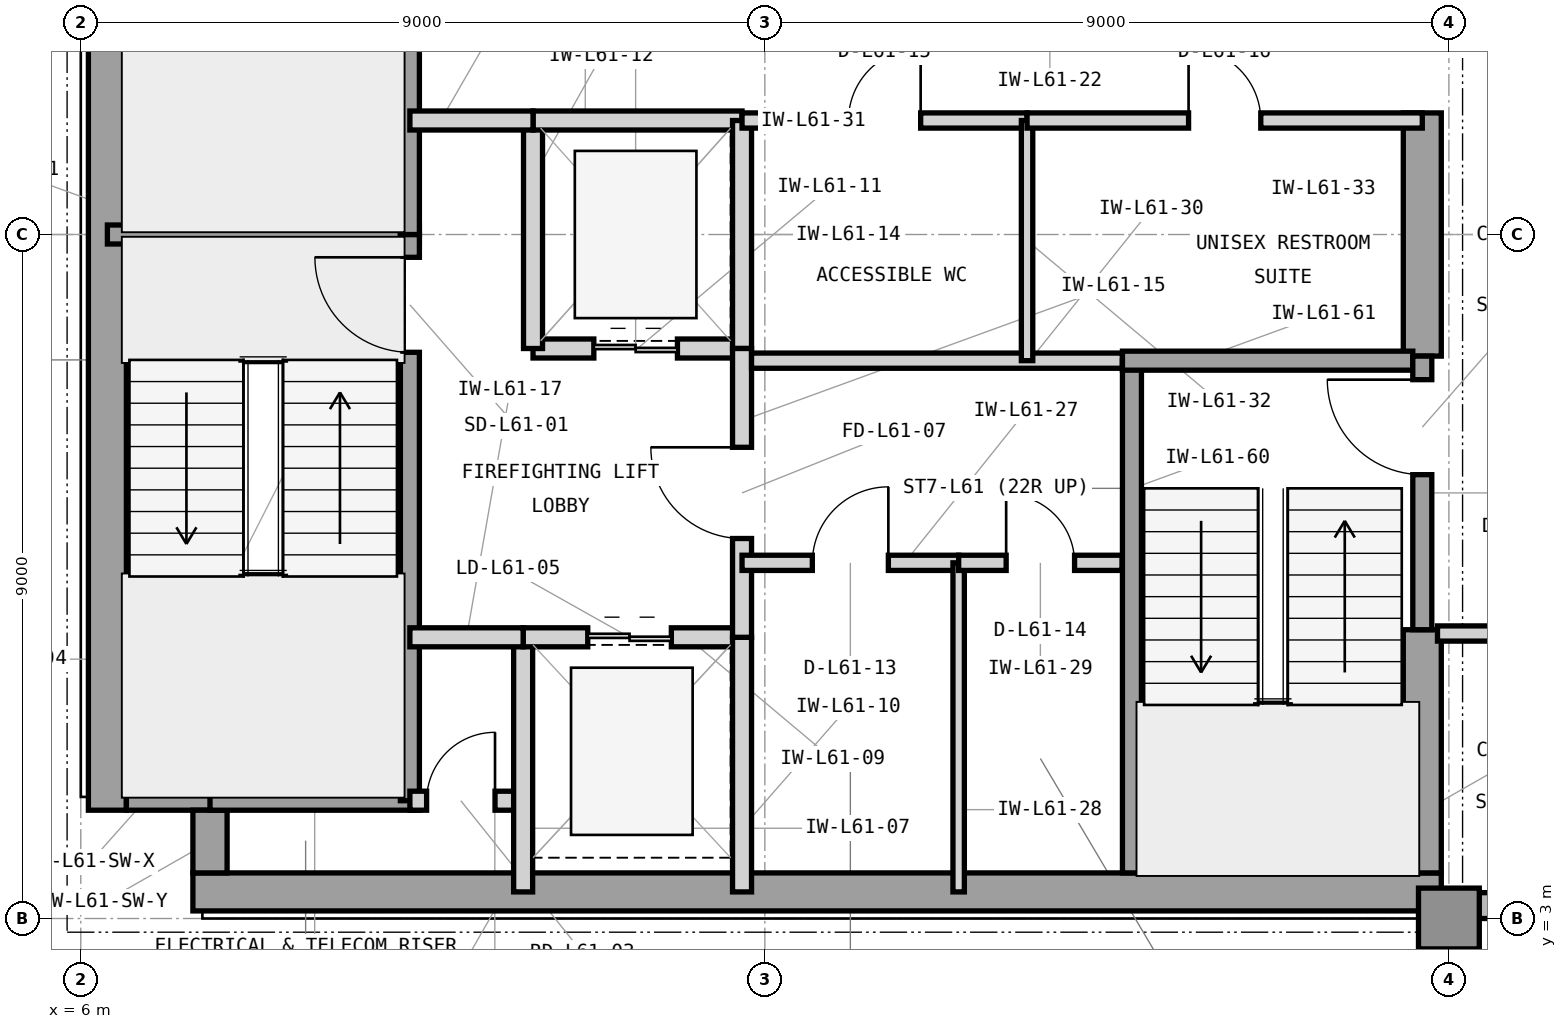
"""IFC4 building model, lengths in metres.
Left out: names, types, materials, properties, quantities, classifications, styles, units other than length and angle.
Written with IfcOpenShell. Run it as: python <this file> out.ifc"""

import sys

from ifc_helpers import new_model, si_unit, direction, frame, frame_2d, origin, origin_2d, place, context, subcontext, project, spatial, rectangle, extrude, element, fill, save


model = new_model("IFC4")
c1 = context("Model", 3, precision=1e-05, world=origin(), true_north=direction((0.0, 1.0)))
c2 = subcontext(c1, "Body", "Model", "MODEL_VIEW")
j1 = project(units=[si_unit("LENGTHUNIT", "METRE"), si_unit("PLANEANGLEUNIT", "RADIAN")], contexts=[c1])
p1 = place(None, origin())
s1 = spatial("IfcSite", under=j1, at=p1, CompositionType="ELEMENT")
p2 = place(p1, origin())
s2 = spatial("IfcBuilding", under=s1, at=p2, CompositionType="ELEMENT")
p3 = place(p2, frame((0.0, 0.0, 250.8)))
s3 = spatial("IfcBuildingStorey", under=s2, at=p3, CompositionType="ELEMENT", Elevation=250.8)
p4 = place(p3, frame((7.475, 3.35, 0.0), z_axis=(0.0, 0.0, 1.0), x_axis=(1.0, 0.0, 0.0)))
e1 = element("IfcWall", 1, at=p4, inside=s3, PredefinedType="SHEAR", context=c2, shape_type="SweptSolid", body=[
    extrude(rectangle(XDim=16.425, YDim=0.5, at=frame_2d((8.212, 0.0))), origin(), (0.0, 0.0, 1.0), 3.9),
])
p5 = place(p3, frame((6.35, 4.425, 0.0), z_axis=(0.0, 0.0, 1.0), x_axis=(0.0, 1.0, 0.0)))
e2 = element("IfcWall", 2, at=p5, inside=s3, PredefinedType="SHEAR", context=c2, shape_type="SweptSolid", body=[
    extrude(rectangle(XDim=15.15, YDim=0.5, at=frame_2d((7.575, 0.0))), origin(), (0.0, 0.0, 1.0), 3.9),
])
p6 = place(p3, frame((23.65, 3.6, 0.0), z_axis=(0.0, 0.0, 1.0), x_axis=(0.0, 1.0, 0.0)))
e3 = element("IfcWall", 3, at=p6, inside=s3, PredefinedType="SHEAR", context=c2, shape_type="SweptSolid", body=[
    extrude(rectangle(XDim=3.2, YDim=0.5, at=frame_2d((1.6, 0.0))), origin(), (0.0, 0.0, 1.0), 3.9),
])
p7 = place(p3, frame((23.65, 10.4, 0.0), z_axis=(0.0, 0.0, 1.0), x_axis=(0.0, 1.0, 0.0)))
e4 = element("IfcWall", 4, at=p7, inside=s3, PredefinedType="SHEAR", context=c2, shape_type="SweptSolid", body=[
    extrude(rectangle(XDim=3.2, YDim=0.5, at=frame_2d((1.6, 0.0))), origin(), (0.0, 0.0, 1.0), 3.9),
])
p8 = place(p3, frame((6.6, 4.65, 0.0), z_axis=(0.0, 0.0, 1.0), x_axis=(1.0, 0.0, 0.0)))
e5 = element("IfcWall", 5, at=p8, inside=s3, PredefinedType="SHEAR", context=c2, shape_type="SweptSolid", body=[
    extrude(rectangle(XDim=1.325, YDim=0.45, at=frame_2d((0.663, 0.0))), origin(), (0.0, 0.0, 1.0), 3.9),
])
p9 = place(p3, frame((7.7, 3.6, 0.0), z_axis=(0.0, 0.0, 1.0), x_axis=(0.0, 1.0, 0.0)))
e6 = element("IfcWall", 6, at=p9, inside=s3, PredefinedType="SHEAR", context=c2, shape_type="SweptSolid", body=[
    extrude(rectangle(XDim=0.825, YDim=0.45, at=frame_2d((0.413, 0.0))), origin(), (0.0, 0.0, 1.0), 3.9),
])
p10 = place(p3, frame((24.0, 3.0, 0.0), z_axis=(0.0, 0.0, 1.0), x_axis=(1.0, 0.0, 0.0)))
e7 = element("IfcColumn", 7, at=p10, inside=s3, PredefinedType="COLUMN", context=c2, shape_type="SweptSolid", body=[
    extrude(rectangle(XDim=0.8, YDim=0.8, at=origin_2d()), origin(), (0.0, 0.0, 1.0), 3.9),
])
p11 = place(p3, frame((23.9, 3.17, 0.0), z_axis=(0.0, 0.0, 1.0), x_axis=(1.0, 0.0, 0.0)))
e8 = element("IfcWall", 8, at=p11, inside=s3, PredefinedType="STANDARD", context=c2, shape_type="SweptSolid", body=[
    extrude(rectangle(XDim=28.5, YDim=0.34, at=frame_2d((14.25, 0.0))), origin(), (0.0, 0.0, 1.0), 3.715),
])
p12 = place(p11, frame((10.725, 0.0, 0.9)))
e9 = element("IfcOpeningElement", 9, at=p12, cuts=e8, PredefinedType="OPENING", context=c2, shape_type="SweptSolid", body=[
    extrude(rectangle(XDim=2.3, YDim=2.2, at=frame_2d((1.15, 1.1))), frame((0.0, 0.18, 0.0), z_axis=(0.0, -1.0, 0.0), x_axis=(1.0, 0.0, 0.0)), (0.0, 0.0, 1.0), 0.36),
])
p13 = place(p11, frame((0.85, 0.0, 0.9)))
e10 = element("IfcOpeningElement", 10, at=p13, cuts=e8, PredefinedType="OPENING", context=c2, shape_type="SweptSolid", body=[
    extrude(rectangle(XDim=1.6, YDim=2.2, at=frame_2d((0.8, 1.1))), frame((0.0, 0.18, 0.0), z_axis=(0.0, -1.0, 0.0), x_axis=(1.0, 0.0, 0.0)), (0.0, 0.0, 1.0), 0.36),
])
p14 = place(p11, frame((19.075, 0.0, 0.9)))
e11 = element("IfcOpeningElement", 11, at=p14, cuts=e8, PredefinedType="OPENING", context=c2, shape_type="SweptSolid", body=[
    extrude(rectangle(XDim=2.3, YDim=2.2, at=frame_2d((1.15, 1.1))), frame((0.0, 0.18, 0.0), z_axis=(0.0, -1.0, 0.0), x_axis=(1.0, 0.0, 0.0)), (0.0, 0.0, 1.0), 0.36),
])
p15 = place(p3, frame((6.35, 12.0, 0.0), z_axis=(0.0, 0.0, 1.0), x_axis=(1.0, 0.0, 0.0)))
e12 = element("IfcWall", 12, at=p15, inside=s3, PredefinedType="SHEAR", context=c2, shape_type="SweptSolid", body=[
    extrude(rectangle(XDim=4.105, YDim=0.25, at=frame_2d((2.052, 0.0))), origin(), (0.0, 0.0, 1.0), 3.9),
])
p16 = place(p3, frame((7.7, 4.55, 0.0), z_axis=(0.0, 0.0, 1.0), x_axis=(1.0, 0.0, 0.0)))
e13 = element("IfcWall", 13, at=p16, inside=s3, PredefinedType="SHEAR", context=c2, shape_type="SweptSolid", body=[
    extrude(rectangle(XDim=2.755, YDim=0.25, at=frame_2d((1.377, 0.0))), origin(), (0.0, 0.0, 1.0), 3.9),
])
p17 = place(p3, frame((10.33, 4.55, 0.0), z_axis=(0.0, 0.0, 1.0), x_axis=(0.0, 1.0, 0.0)))
e14 = element("IfcWall", 14, at=p17, inside=s3, PredefinedType="SHEAR", context=c2, shape_type="SweptSolid", body=[
    extrude(rectangle(XDim=7.45, YDim=0.25, at=frame_2d((3.725, 0.0))), origin(), (0.0, 0.0, 1.0), 3.9),
])
p18 = place(p17, frame((5.9, 0.0, 0.0)))
e15 = element("IfcOpeningElement", 15, at=p18, cuts=e14, PredefinedType="OPENING", context=c2, shape_type="SweptSolid", body=[
    extrude(rectangle(XDim=1.25, YDim=2.2, at=frame_2d((0.625, 1.1))), frame((0.0, 0.135, 0.0), z_axis=(0.0, -1.0, 0.0), x_axis=(1.0, 0.0, 0.0)), (0.0, 0.0, 1.0), 0.27),
])
p19 = place(p3, frame((10.33, 12.0, 0.0), z_axis=(0.0, 0.0, 1.0), x_axis=(0.0, 1.0, 0.0)))
e16 = element("IfcWall", 16, at=p19, inside=s3, PredefinedType="SHEAR", context=c2, shape_type="SweptSolid", body=[
    extrude(rectangle(XDim=7.45, YDim=0.25, at=frame_2d((3.725, 0.0))), origin(), (0.0, 0.0, 1.0), 3.9),
])
p20 = place(p19, frame((5.85, 0.0, 0.0)))
e17 = element("IfcOpeningElement", 17, at=p20, cuts=e16, PredefinedType="OPENING", context=c2, shape_type="SweptSolid", body=[
    extrude(rectangle(XDim=1.25, YDim=2.2, at=frame_2d((0.625, 1.1))), frame((0.0, 0.135, 0.0), z_axis=(0.0, -1.0, 0.0), x_axis=(1.0, 0.0, 0.0)), (0.0, 0.0, 1.0), 0.27),
])
p21 = place(p3, frame((10.33, 4.55, 0.0), z_axis=(0.0, 0.0, 1.0), x_axis=(1.0, 0.0, 0.0)))
e18 = element("IfcWall", 18, at=p21, inside=s3, PredefinedType="PARTITIONING", context=c2, shape_type="SweptSolid", body=[
    extrude(rectangle(XDim=1.49, YDim=0.25, at=frame_2d((0.745, 0.0))), origin(), (0.0, 0.0, 1.0), 3.63),
])
p22 = place(p21, frame((0.22, 0.0, 0.0)))
e19 = element("IfcOpeningElement", 19, at=p22, cuts=e18, PredefinedType="OPENING", context=c2, shape_type="SweptSolid", body=[
    extrude(rectangle(XDim=0.9, YDim=2.1, at=frame_2d((0.45, 1.05))), frame((0.0, 0.135, 0.0), z_axis=(0.0, -1.0, 0.0), x_axis=(1.0, 0.0, 0.0)), (0.0, 0.0, 1.0), 0.27),
])
p23 = place(p3, frame((11.82, 3.35, 0.0), z_axis=(0.0, 0.0, 1.0), x_axis=(0.0, 1.0, 0.0)))
e20 = element("IfcWall", 20, at=p23, inside=s3, PredefinedType="PARTITIONING", context=c2, shape_type="SweptSolid", body=[
    extrude(rectangle(XDim=3.35, YDim=0.25, at=frame_2d((1.675, 0.0))), origin(), (0.0, 0.0, 1.0), 3.63),
])
p24 = place(p3, frame((11.82, 6.7, 0.0), z_axis=(0.0, 0.0, 1.0), x_axis=(1.0, 0.0, 0.0)))
e21 = element("IfcWall", 21, at=p24, inside=s3, PredefinedType="PARTITIONING", context=c2, shape_type="SweptSolid", body=[
    extrude(rectangle(XDim=2.88, YDim=0.25, at=frame_2d((1.44, 0.0))), origin(), (0.0, 0.0, 1.0), 3.088),
])
p25 = place(p24, frame((0.85, 0.0, 0.0)))
e22 = element("IfcOpeningElement", 22, at=p25, cuts=e21, PredefinedType="OPENING", context=c2, shape_type="SweptSolid", body=[
    extrude(rectangle(XDim=1.1, YDim=2.25, at=frame_2d((0.55, 1.125))), frame((0.0, 0.135, 0.0), z_axis=(0.0, -1.0, 0.0), x_axis=(1.0, 0.0, 0.0)), (0.0, 0.0, 1.0), 0.27),
])
p26 = place(p3, frame((14.7, 3.35, 0.0), z_axis=(0.0, 0.0, 1.0), x_axis=(0.0, 1.0, 0.0)))
e23 = element("IfcWall", 23, at=p26, inside=s3, PredefinedType="PARTITIONING", context=c2, shape_type="SweptSolid", body=[
    extrude(rectangle(XDim=3.35, YDim=0.25, at=frame_2d((1.675, 0.0))), origin(), (0.0, 0.0, 1.0), 3.63),
])
p27 = place(p3, frame((11.95, 10.5, 0.0), z_axis=(0.0, 0.0, 1.0), x_axis=(1.0, 0.0, 0.0)))
e24 = element("IfcWall", 24, at=p27, inside=s3, PredefinedType="PARTITIONING", context=c2, shape_type="SweptSolid", body=[
    extrude(rectangle(XDim=2.75, YDim=0.25, at=frame_2d((1.375, 0.0))), origin(), (0.0, 0.0, 1.0), 3.088),
])
p28 = place(p27, frame((0.8, 0.0, 0.0)))
e25 = element("IfcOpeningElement", 25, at=p28, cuts=e24, PredefinedType="OPENING", context=c2, shape_type="SweptSolid", body=[
    extrude(rectangle(XDim=1.1, YDim=2.25, at=frame_2d((0.55, 1.125))), frame((0.0, 0.135, 0.0), z_axis=(0.0, -1.0, 0.0), x_axis=(1.0, 0.0, 0.0)), (0.0, 0.0, 1.0), 0.27),
])
p29 = place(p3, frame((11.95, 10.5, 0.0), z_axis=(0.0, 0.0, 1.0), x_axis=(0.0, 1.0, 0.0)))
e26 = element("IfcWall", 26, at=p29, inside=s3, PredefinedType="PARTITIONING", context=c2, shape_type="SweptSolid", body=[
    extrude(rectangle(XDim=3.0, YDim=0.25, at=frame_2d((1.5, 0.0))), origin(), (0.0, 0.0, 1.0), 3.63),
])
p30 = place(p3, frame((11.95, 13.5, 0.0), z_axis=(0.0, 0.0, 1.0), x_axis=(1.0, 0.0, 0.0)))
e27 = element("IfcWall", 27, at=p30, inside=s3, PredefinedType="PARTITIONING", context=c2, shape_type="SweptSolid", body=[
    extrude(rectangle(XDim=2.75, YDim=0.25, at=frame_2d((1.375, 0.0))), origin(), (0.0, 0.0, 1.0), 3.088),
])
p31 = place(p3, frame((14.7, 10.5, 0.0), z_axis=(0.0, 0.0, 1.0), x_axis=(0.0, 1.0, 0.0)))
e28 = element("IfcWall", 28, at=p31, inside=s3, PredefinedType="PARTITIONING", context=c2, shape_type="SweptSolid", body=[
    extrude(rectangle(XDim=3.0, YDim=0.25, at=frame_2d((1.5, 0.0))), origin(), (0.0, 0.0, 1.0), 3.63),
])
p32 = place(p3, frame((14.7, 6.7, 0.0), z_axis=(0.0, 0.0, 1.0), x_axis=(0.0, 1.0, 0.0)))
e29 = element("IfcWall", 29, at=p32, inside=s3, PredefinedType="PARTITIONING", context=c2, shape_type="SweptSolid", body=[
    extrude(rectangle(XDim=3.8, YDim=0.25, at=frame_2d((1.9, 0.0))), origin(), (0.0, 0.0, 1.0), 3.63),
])
p33 = place(p32, frame((1.3, 0.0, 0.0)))
e30 = element("IfcOpeningElement", 30, at=p33, cuts=e29, PredefinedType="OPENING", context=c2, shape_type="SweptSolid", body=[
    extrude(rectangle(XDim=1.2, YDim=2.2, at=frame_2d((0.6, 1.1))), frame((0.0, 0.135, 0.0), z_axis=(0.0, -1.0, 0.0), x_axis=(1.0, 0.0, 0.0)), (0.0, 0.0, 1.0), 0.27),
])
p34 = place(p3, frame((10.33, 13.5, 0.0), z_axis=(0.0, 0.0, 1.0), x_axis=(1.0, 0.0, 0.0)))
e31 = element("IfcWall", 31, at=p34, inside=s3, PredefinedType="PARTITIONING", context=c2, shape_type="SweptSolid", body=[
    extrude(rectangle(XDim=1.62, YDim=0.25, at=frame_2d((0.81, 0.0))), origin(), (0.0, 0.0, 1.0), 3.088),
])
p35 = place(p3, frame((10.33, 6.7, 0.0), z_axis=(0.0, 0.0, 1.0), x_axis=(1.0, 0.0, 0.0)))
e32 = element("IfcWall", 32, at=p35, inside=s3, PredefinedType="PARTITIONING", context=c2, shape_type="SweptSolid", body=[
    extrude(rectangle(XDim=1.49, YDim=0.25, at=frame_2d((0.745, 0.0))), origin(), (0.0, 0.0, 1.0), 3.088),
])
p36 = place(p3, frame((14.7, 7.68, 0.0), z_axis=(0.0, 0.0, 1.0), x_axis=(1.0, 0.0, 0.0)))
e33 = element("IfcWall", 33, at=p36, inside=s3, PredefinedType="PARTITIONING", context=c2, shape_type="SweptSolid", body=[
    extrude(rectangle(XDim=2.85, YDim=0.2, at=frame_2d((1.425, 0.0))), origin(), (0.0, 0.0, 1.0), 3.63),
])
p37 = place(p36, frame((0.925, 0.0, 0.0)))
e34 = element("IfcOpeningElement", 34, at=p37, cuts=e33, PredefinedType="OPENING", context=c2, shape_type="SweptSolid", body=[
    extrude(rectangle(XDim=1.0, YDim=2.15, at=frame_2d((0.5, 1.075))), frame((0.0, 0.11, 0.0), z_axis=(0.0, -1.0, 0.0), x_axis=(1.0, 0.0, 0.0)), (0.0, 0.0, 1.0), 0.22),
])
p38 = place(p3, frame((17.55, 3.35, 0.0), z_axis=(0.0, 0.0, 1.0), x_axis=(0.0, 1.0, 0.0)))
e35 = element("IfcWall", 35, at=p38, inside=s3, PredefinedType="PARTITIONING", context=c2, shape_type="SweptSolid", body=[
    extrude(rectangle(XDim=4.33, YDim=0.15, at=frame_2d((2.165, 0.0))), origin(), (0.0, 0.0, 1.0), 3.63),
])
p39 = place(p3, frame((17.55, 7.68, 0.0), z_axis=(0.0, 0.0, 1.0), x_axis=(1.0, 0.0, 0.0)))
e36 = element("IfcWall", 36, at=p39, inside=s3, PredefinedType="PARTITIONING", context=c2, shape_type="SweptSolid", body=[
    extrude(rectangle(XDim=2.15, YDim=0.2, at=frame_2d((1.075, 0.0))), origin(), (0.0, 0.0, 1.0), 3.63),
])
p40 = place(p39, frame((0.625, 0.0, 0.0)))
e37 = element("IfcOpeningElement", 37, at=p40, cuts=e36, PredefinedType="OPENING", context=c2, shape_type="SweptSolid", body=[
    extrude(rectangle(XDim=0.9, YDim=2.1, at=frame_2d((0.45, 1.05))), frame((0.0, 0.11, 0.0), z_axis=(0.0, -1.0, 0.0), x_axis=(1.0, 0.0, 0.0)), (0.0, 0.0, 1.0), 0.22),
])
p41 = place(p3, frame((14.825, 10.34, 0.0), z_axis=(0.0, 0.0, 1.0), x_axis=(1.0, 0.0, 0.0)))
e38 = element("IfcWall", 38, at=p41, inside=s3, PredefinedType="PARTITIONING", context=c2, shape_type="SweptSolid", body=[
    extrude(rectangle(XDim=4.88, YDim=0.2, at=frame_2d((2.44, 0.0))), origin(), (0.0, 0.0, 1.0), 3.088),
])
p42 = place(p3, frame((14.7, 13.5, 0.0), z_axis=(0.0, 0.0, 1.0), x_axis=(1.0, 0.0, 0.0)))
e39 = element("IfcWall", 39, at=p42, inside=s3, PredefinedType="PARTITIONING", context=c2, shape_type="SweptSolid", body=[
    extrude(rectangle(XDim=3.75, YDim=0.2, at=frame_2d((1.875, 0.0))), origin(), (0.0, 0.0, 1.0), 3.088),
])
p43 = place(p42, frame((1.4, 0.0, 0.0)))
e40 = element("IfcOpeningElement", 40, at=p43, cuts=e39, PredefinedType="OPENING", context=c2, shape_type="SweptSolid", body=[
    extrude(rectangle(XDim=0.95, YDim=2.1, at=frame_2d((0.475, 1.05))), frame((0.0, 0.11, 0.0), z_axis=(0.0, -1.0, 0.0), x_axis=(1.0, 0.0, 0.0)), (0.0, 0.0, 1.0), 0.22),
])
p44 = place(p3, frame((18.45, 10.34, 0.0), z_axis=(0.0, 0.0, 1.0), x_axis=(0.0, 1.0, 0.0)))
e41 = element("IfcWall", 41, at=p44, inside=s3, PredefinedType="PARTITIONING", context=c2, shape_type="SweptSolid", body=[
    extrude(rectangle(XDim=3.16, YDim=0.15, at=frame_2d((1.58, 0.0))), origin(), (0.0, 0.0, 1.0), 3.63),
])
p45 = place(p3, frame((18.45, 13.5, 0.0), z_axis=(0.0, 0.0, 1.0), x_axis=(1.0, 0.0, 0.0)))
e42 = element("IfcWall", 42, at=p45, inside=s3, PredefinedType="PARTITIONING", context=c2, shape_type="SweptSolid", body=[
    extrude(rectangle(XDim=5.2, YDim=0.2, at=frame_2d((2.6, 0.0))), origin(), (0.0, 0.0, 1.0), 3.088),
])
p46 = place(p45, frame((2.125, 0.0, 0.0)))
e43 = element("IfcOpeningElement", 43, at=p46, cuts=e42, PredefinedType="OPENING", context=c2, shape_type="SweptSolid", body=[
    extrude(rectangle(XDim=0.95, YDim=2.1, at=frame_2d((0.475, 1.05))), frame((0.0, 0.11, 0.0), z_axis=(0.0, -1.0, 0.0), x_axis=(1.0, 0.0, 0.0)), (0.0, 0.0, 1.0), 0.22),
])
p47 = place(p3, frame((23.85, 6.75, 0.0), z_axis=(0.0, 0.0, 1.0), x_axis=(1.0, 0.0, 0.0)))
e44 = element("IfcWall", 44, at=p47, inside=s3, PredefinedType="PARTITIONING", context=c2, shape_type="SweptSolid", body=[
    extrude(rectangle(XDim=2.85, YDim=0.2, at=frame_2d((1.425, 0.0))), origin(), (0.0, 0.0, 1.0), 3.63),
])
p48 = place(p47, frame((0.7, 0.0, 0.0)))
e45 = element("IfcOpeningElement", 45, at=p48, cuts=e44, PredefinedType="OPENING", context=c2, shape_type="SweptSolid", body=[
    extrude(rectangle(XDim=1.0, YDim=2.15, at=frame_2d((0.5, 1.075))), frame((0.0, 0.11, 0.0), z_axis=(0.0, -1.0, 0.0), x_axis=(1.0, 0.0, 0.0)), (0.0, 0.0, 1.0), 0.22),
])
p49 = place(p3, frame((19.83, 3.6, 0.0), z_axis=(0.0, 0.0, 1.0), x_axis=(0.0, 1.0, 0.0)))
e46 = element("IfcWall", 46, at=p49, inside=s3, PredefinedType="SHEAR", context=c2, shape_type="SweptSolid", body=[
    extrude(rectangle(XDim=6.74, YDim=0.25, at=frame_2d((3.37, 0.0))), origin(), (0.0, 0.0, 1.0), 3.9),
])
p50 = place(p3, frame((19.705, 10.34, 0.0), z_axis=(0.0, 0.0, 1.0), x_axis=(1.0, 0.0, 0.0)))
e47 = element("IfcWall", 47, at=p50, inside=s3, PredefinedType="SHEAR", context=c2, shape_type="SweptSolid", body=[
    extrude(rectangle(XDim=3.82, YDim=0.25, at=frame_2d((1.91, 0.0))), origin(), (0.0, 0.0, 1.0), 3.9),
])
p51 = place(p3, frame((23.65, 6.8, 0.0), z_axis=(0.0, 0.0, 1.0), x_axis=(0.0, 1.0, 0.0)))
e48 = element("IfcWall", 48, at=p51, inside=s3, PredefinedType="SHEAR", context=c2, shape_type="SweptSolid", body=[
    extrude(rectangle(XDim=3.6, YDim=0.25, at=frame_2d((1.8, 0.0))), origin(), (0.0, 0.0, 1.0), 3.9),
])
p52 = place(p51, frame((2.04, 0.0, 0.0)))
e49 = element("IfcOpeningElement", 49, at=p52, cuts=e48, PredefinedType="OPENING", context=c2, shape_type="SweptSolid", body=[
    extrude(rectangle(XDim=1.25, YDim=2.2, at=frame_2d((0.625, 1.1))), frame((0.0, 0.135, 0.0), z_axis=(0.0, -1.0, 0.0), x_axis=(1.0, 0.0, 0.0)), (0.0, 0.0, 1.0), 0.27),
])
p53 = place(p18, origin())
e50 = element("IfcDoor", 50, at=p53, inside=s3, OperationType="SINGLE_SWING_RIGHT", PredefinedType="DOOR", context=c2, shape_type="SweptSolid", body=[
    extrude(rectangle(XDim=1.25, YDim=2.2, at=frame_2d((0.625, 1.1))), frame((0.0, 0.025, 0.0), z_axis=(0.0, -1.0, 0.0), x_axis=(1.0, 0.0, 0.0)), (0.0, 0.0, 1.0), 0.05),
])
fill(e15, e50)
p54 = place(p22, origin())
e51 = element("IfcDoor", 51, at=p54, inside=s3, OperationType="SINGLE_SWING_RIGHT", PredefinedType="TRAPDOOR", context=c2, shape_type="SweptSolid", body=[
    extrude(rectangle(XDim=0.9, YDim=2.1, at=frame_2d((0.45, 1.05))), frame((0.0, 0.025, 0.0), z_axis=(0.0, -1.0, 0.0), x_axis=(1.0, 0.0, 0.0)), (0.0, 0.0, 1.0), 0.05),
])
fill(e19, e51)
p55 = place(p25, origin())
e52 = element("IfcDoor", 52, at=p55, inside=s3, OperationType="DOUBLE_DOOR_SLIDING", PredefinedType="DOOR", context=c2, shape_type="SweptSolid", body=[
    extrude(rectangle(XDim=1.1, YDim=2.25, at=frame_2d((0.55, 1.125))), frame((0.0, 0.025, 0.0), z_axis=(0.0, -1.0, 0.0), x_axis=(1.0, 0.0, 0.0)), (0.0, 0.0, 1.0), 0.05),
])
fill(e22, e52)
p56 = place(p28, origin())
e53 = element("IfcDoor", 53, at=p56, inside=s3, OperationType="DOUBLE_DOOR_SLIDING", PredefinedType="DOOR", context=c2, shape_type="SweptSolid", body=[
    extrude(rectangle(XDim=1.1, YDim=2.25, at=frame_2d((0.55, 1.125))), frame((0.0, 0.025, 0.0), z_axis=(0.0, -1.0, 0.0), x_axis=(1.0, 0.0, 0.0)), (0.0, 0.0, 1.0), 0.05),
])
fill(e25, e53)
p57 = place(p33, origin())
e54 = element("IfcDoor", 54, at=p57, inside=s3, OperationType="SINGLE_SWING_RIGHT", PredefinedType="DOOR", context=c2, shape_type="SweptSolid", body=[
    extrude(rectangle(XDim=1.2, YDim=2.2, at=frame_2d((0.6, 1.1))), frame((0.0, 0.025, 0.0), z_axis=(0.0, -1.0, 0.0), x_axis=(1.0, 0.0, 0.0)), (0.0, 0.0, 1.0), 0.05),
])
fill(e30, e54)
p58 = place(p37, origin())
e55 = element("IfcDoor", 55, at=p58, inside=s3, OperationType="SINGLE_SWING_RIGHT", PredefinedType="DOOR", context=c2, shape_type="SweptSolid", body=[
    extrude(rectangle(XDim=1.0, YDim=2.15, at=frame_2d((0.5, 1.075))), frame((0.0, 0.025, 0.0), z_axis=(0.0, -1.0, 0.0), x_axis=(1.0, 0.0, 0.0)), (0.0, 0.0, 1.0), 0.05),
])
fill(e34, e55)
p59 = place(p40, origin())
e56 = element("IfcDoor", 56, at=p59, inside=s3, OperationType="SINGLE_SWING_LEFT", PredefinedType="TRAPDOOR", context=c2, shape_type="SweptSolid", body=[
    extrude(rectangle(XDim=0.9, YDim=2.1, at=frame_2d((0.45, 1.05))), frame((0.0, 0.025, 0.0), z_axis=(0.0, -1.0, 0.0), x_axis=(1.0, 0.0, 0.0)), (0.0, 0.0, 1.0), 0.05),
])
fill(e37, e56)
p60 = place(p43, origin())
e57 = element("IfcDoor", 57, at=p60, inside=s3, OperationType="SINGLE_SWING_RIGHT", PredefinedType="DOOR", context=c2, shape_type="SweptSolid", body=[
    extrude(rectangle(XDim=0.95, YDim=2.1, at=frame_2d((0.475, 1.05))), frame((0.0, 0.025, 0.0), z_axis=(0.0, -1.0, 0.0), x_axis=(1.0, 0.0, 0.0)), (0.0, 0.0, 1.0), 0.05),
])
fill(e40, e57)
p61 = place(p46, origin())
e58 = element("IfcDoor", 58, at=p61, inside=s3, OperationType="SINGLE_SWING_LEFT", PredefinedType="DOOR", context=c2, shape_type="SweptSolid", body=[
    extrude(rectangle(XDim=0.95, YDim=2.1, at=frame_2d((0.475, 1.05))), frame((0.0, 0.025, 0.0), z_axis=(0.0, -1.0, 0.0), x_axis=(1.0, 0.0, 0.0)), (0.0, 0.0, 1.0), 0.05),
])
fill(e43, e58)
p62 = place(p52, origin())
e59 = element("IfcDoor", 59, at=p62, inside=s3, OperationType="SINGLE_SWING_RIGHT", PredefinedType="DOOR", context=c2, shape_type="SweptSolid", body=[
    extrude(rectangle(XDim=1.25, YDim=2.2, at=frame_2d((0.625, 1.1))), frame((0.0, 0.025, 0.0), z_axis=(0.0, -1.0, 0.0), x_axis=(1.0, 0.0, 0.0)), (0.0, 0.0, 1.0), 0.05),
])
fill(e49, e59)
save(model, sys.argv[1])
